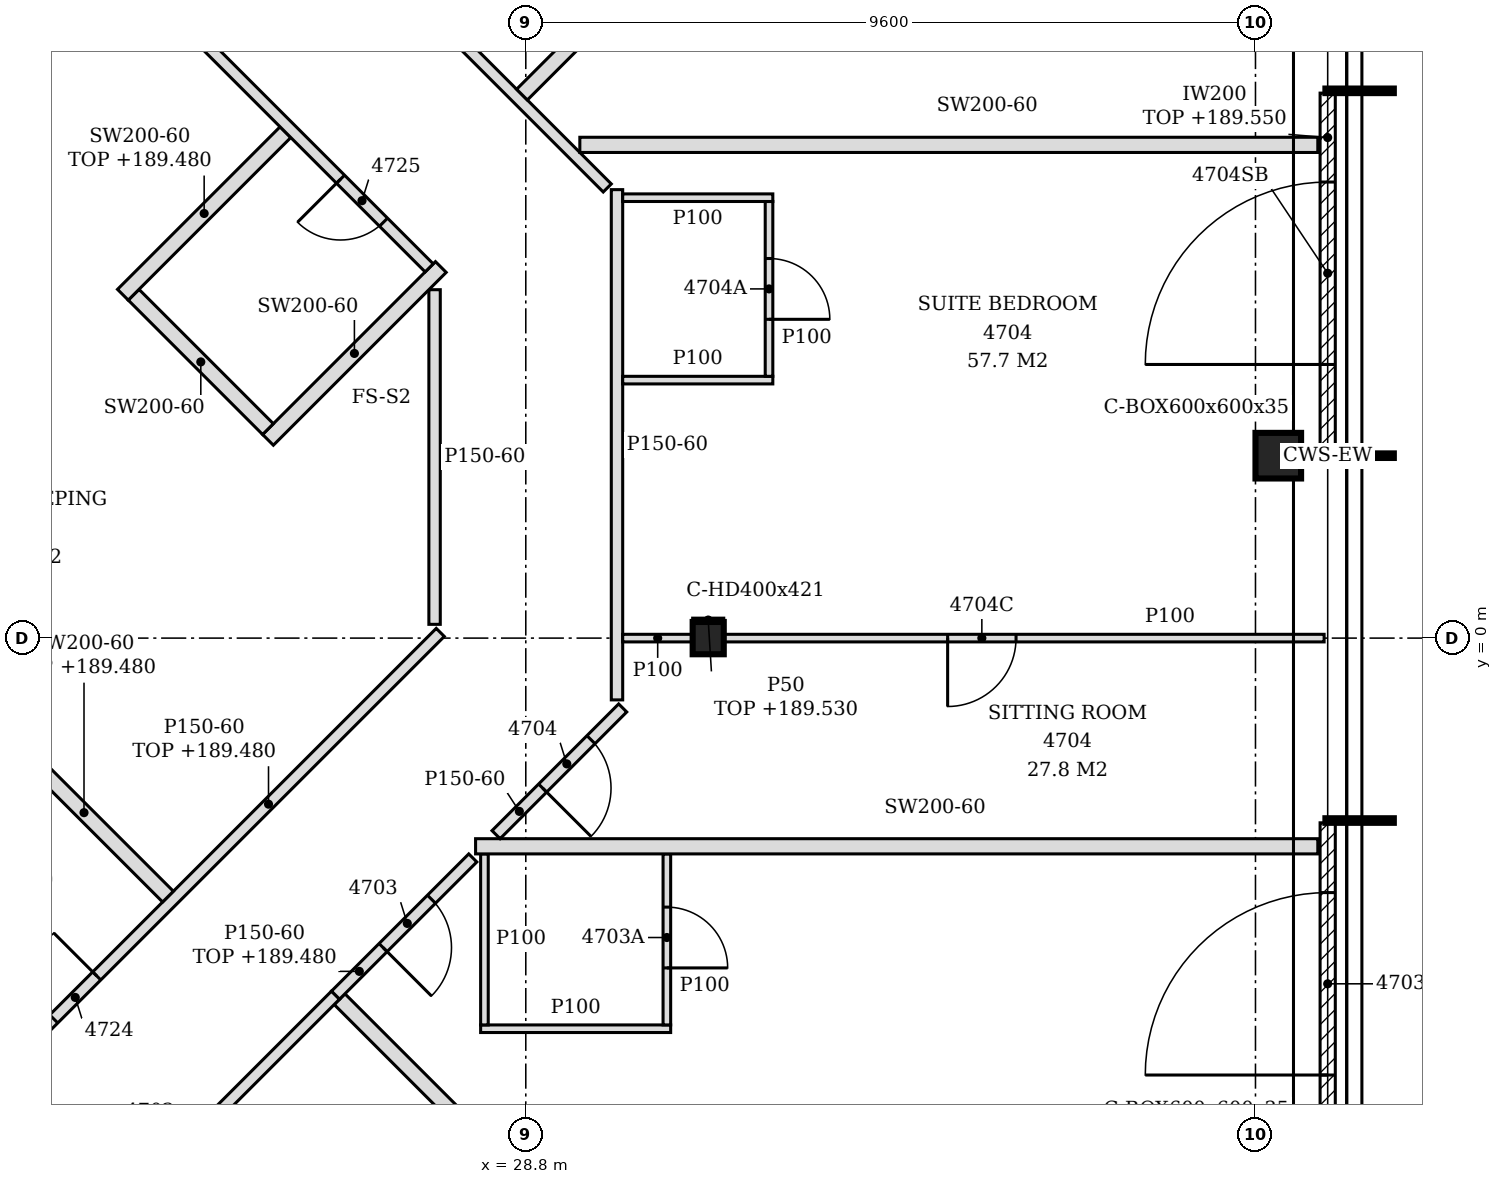
"""IFC4 building model, lengths in metres.
Left out: names, types, materials, properties, quantities, classifications, styles, units other than length and angle.
Written with IfcOpenShell. Run it as: python <this file> out.ifc"""

import sys

from ifc_helpers import new_model, si_unit, direction, frame, frame_2d, origin, origin_2d, place, context, subcontext, project, spatial, polyline, rectangle, hollow_rectangle, i_section, outline, extrude, clip, halfspace, element, fill, save


model = new_model("IFC4")
c1 = context("Model", 3, precision=1e-05, world=origin(), true_north=direction((0.0, 1.0)))
c2 = subcontext(c1, "Body", "Model", "MODEL_VIEW")
j1 = project(units=[si_unit("LENGTHUNIT", "METRE"), si_unit("PLANEANGLEUNIT", "RADIAN")], contexts=[c1])
p1 = place(None, origin())
s1 = spatial("IfcSite", under=j1, at=p1, CompositionType="ELEMENT")
p2 = place(p1, origin())
s2 = spatial("IfcBuilding", under=s1, at=p2, CompositionType="ELEMENT")
p3 = place(p2, frame((0.0, 0.0, 186.6)))
s3 = spatial("IfcBuildingStorey", under=s2, at=p3, CompositionType="ELEMENT", Elevation=186.6)
p4 = place(p3, frame((38.7, 2.4, -0.15), z_axis=(0.387218850162, -0.258105883692, 0.885123107191), x_axis=(0.554640662713, 0.83208998027, 0.0)))
e1 = element("IfcColumn", 1, at=p4, inside=s3, PredefinedType="COLUMN", context=c2, shape_type="Clipping", body=[
    clip(extrude(hollow_rectangle(XDim=0.6, YDim=0.6, WallThickness=0.035, at=origin_2d()), origin(), (0.0, 0.0, 1.0), 4.067), halfspace(frame((0.0, 0.0, 4.049), z_axis=(0.0, 0.0, 1.0), x_axis=(1.0, 0.0, 0.0)), False)),
])
p5 = place(p3, frame((31.2, 0.0, -0.15), z_axis=(0.0, 0.0, 1.0), x_axis=(1.0, 0.0, 0.0)))
e2 = element("IfcColumn", 2, at=p5, inside=s3, PredefinedType="COLUMN", context=c2, shape_type="SweptSolid", body=[
    extrude(i_section(OverallWidth=0.409, OverallDepth=0.425, WebThickness=0.033, FlangeThickness=0.052, FilletRadius=0.015, at=origin_2d()), origin(), (0.0, 0.0, 1.0), 3.6),
])
p6 = place(p3, frame((39.35, -7.056, 0.0), z_axis=(0.0, 0.0, 1.0), x_axis=(0.0, 1.0, 0.0)))
e3 = element("IfcWall", 3, at=p6, inside=s3, PredefinedType="NOTDEFINED", context=c2, shape_type="SweptSolid", body=[
    extrude(rectangle(XDim=4.626, YDim=0.2, at=frame_2d((2.313, 0.0))), origin(), (0.0, 0.0, 1.0), 2.95),
])
p7 = place(p6, frame((1.308, 0.0, 0.0)))
e4 = element("IfcOpeningElement", 4, at=p7, cuts=e3, PredefinedType="OPENING", context=c2, shape_type="SweptSolid", body=[
    extrude(rectangle(XDim=2.4, YDim=2.4, at=frame_2d((1.2, 1.2))), frame((0.0, 0.11, 0.0), z_axis=(0.0, -1.0, 0.0), x_axis=(1.0, 0.0, 0.0)), (0.0, 0.0, 1.0), 0.22),
])
p8 = place(p3, frame((39.35, 2.43, 0.0), z_axis=(0.0, 0.0, 1.0), x_axis=(0.0, 1.0, 0.0)))
e5 = element("IfcWall", 5, at=p8, inside=s3, PredefinedType="NOTDEFINED", context=c2, shape_type="SweptSolid", body=[
    extrude(rectangle(XDim=4.74, YDim=0.2, at=frame_2d((2.37, 0.0))), origin(), (0.0, 0.0, 1.0), 2.95),
])
p9 = place(p8, frame((1.17, 0.0, 0.0)))
e6 = element("IfcOpeningElement", 6, at=p9, cuts=e5, PredefinedType="OPENING", context=c2, shape_type="SweptSolid", body=[
    extrude(rectangle(XDim=2.4, YDim=2.4, at=frame_2d((1.2, 1.2))), frame((0.0, 0.11, 0.0), z_axis=(0.0, -1.0, 0.0), x_axis=(1.0, 0.0, 0.0)), (0.0, 0.0, 1.0), 0.22),
])
p10 = place(p3, frame((33.981, -12.381, 0.0), z_axis=(0.0, 0.0, 1.0), x_axis=(-0.707095469378, 0.707118092814, 0.0)))
e7 = element("IfcWall", 7, at=p10, inside=s3, PredefinedType="PARTITIONING", context=c2, shape_type="SweptSolid", body=[
    extrude(rectangle(XDim=10.792, YDim=0.2, at=frame_2d((5.396, 0.0))), origin(), (0.0, 0.0, 1.0), 2.63),
])
p11 = place(p3, frame((20.322, -10.672, 0.0), z_axis=(0.0, 0.0, 1.0), x_axis=(0.707106781187, 0.707106781187, 0.0)))
e8 = element("IfcWall", 8, at=p11, inside=s3, PredefinedType="PARTITIONING", context=c2, shape_type="SweptSolid", body=[
    extrude(rectangle(XDim=8.45, YDim=0.15, at=frame_2d((4.225, 0.0))), origin(), (0.0, 0.0, 1.0), 2.88),
])
p12 = place(p11, frame((0.869, 0.0, 0.0)))
e9 = element("IfcOpeningElement", 9, at=p12, cuts=e8, PredefinedType="OPENING", context=c2, shape_type="SweptSolid", body=[
    extrude(rectangle(XDim=0.9, YDim=2.1, at=frame_2d((0.45, 1.05))), frame((0.0, 0.085, 0.0), z_axis=(0.0, -1.0, 0.0), x_axis=(1.0, 0.0, 0.0)), (0.0, 0.0, 1.0), 0.17),
])
p13 = place(p11, frame((5.185, 0.0, 0.0)))
e10 = element("IfcOpeningElement", 10, at=p13, cuts=e8, PredefinedType="OPENING", context=c2, shape_type="SweptSolid", body=[
    extrude(rectangle(XDim=0.9, YDim=2.1, at=frame_2d((0.45, 1.05))), frame((0.0, 0.085, 0.0), z_axis=(0.0, -1.0, 0.0), x_axis=(1.0, 0.0, 0.0)), (0.0, 0.0, 1.0), 0.17),
])
p14 = place(p3, frame((21.671, -5.929, 0.0), z_axis=(0.0, 0.0, 1.0), x_axis=(0.707121156928, 0.707092405153, 0.0)))
e11 = element("IfcWall", 11, at=p14, inside=s3, PredefinedType="PARTITIONING", context=c2, shape_type="SweptSolid", body=[
    extrude(rectangle(XDim=8.491, YDim=0.15, at=frame_2d((4.246, 0.0))), origin(), (0.0, 0.0, 1.0), 2.88),
])
p15 = place(p14, frame((1.3, 0.0, 0.0)))
e12 = element("IfcOpeningElement", 12, at=p15, cuts=e11, PredefinedType="OPENING", context=c2, shape_type="SweptSolid", body=[
    extrude(rectangle(XDim=0.8, YDim=2.1, at=frame_2d((0.4, 1.05))), frame((0.0, 0.085, 0.0), z_axis=(0.0, -1.0, 0.0), x_axis=(1.0, 0.0, 0.0)), (0.0, 0.0, 1.0), 0.17),
])
p16 = place(p3, frame((28.206, -5.139, 0.0), z_axis=(0.0, 0.0, 1.0), x_axis=(1.0, 0.0, 0.0)))
e13 = element("IfcWall", 13, at=p16, inside=s3, PredefinedType="PARTITIONING", context=c2, shape_type="SweptSolid", body=[
    extrude(rectangle(XDim=2.5, YDim=0.1, at=frame_2d((1.25, 0.0))), origin(), (0.0, 0.0, 1.0), 3.45),
])
p17 = place(p3, frame((28.256, -5.089, 0.0), z_axis=(0.0, 0.0, 1.0), x_axis=(0.0, 1.0, 0.0)))
e14 = element("IfcWall", 14, at=p17, inside=s3, PredefinedType="PARTITIONING", context=c2, shape_type="SweptSolid", body=[
    extrude(outline(polyline([(0.0, 0.0), (2.25, 0.0), (2.25, 3.45), (1.744, 3.45), (1.742, 2.88), (1.534, 2.88), (1.532, 3.45), (0.0, 3.45), (0.0, 0.0)])), frame((0.0, 0.05, 0.0), z_axis=(0.0, -1.0, 0.0), x_axis=(1.0, 0.0, 0.0)), (0.0, 0.0, 1.0), 0.1),
])
p18 = place(p3, frame((30.656, -5.089, 0.0), z_axis=(0.0, 0.0, 1.0), x_axis=(0.0, 1.0, 0.0)))
e15 = element("IfcWall", 15, at=p18, inside=s3, PredefinedType="PARTITIONING", context=c2, shape_type="SweptSolid", body=[
    extrude(outline(polyline([(0.0, 0.0), (2.25, 0.0), (2.25, 3.45), (1.744, 3.45), (1.742, 2.88), (1.534, 2.88), (1.532, 3.45), (0.0, 3.45), (0.0, 0.0)])), frame((0.0, 0.05, 0.0), z_axis=(0.0, -1.0, 0.0), x_axis=(1.0, 0.0, 0.0)), (0.0, 0.0, 1.0), 0.1),
])
p19 = place(p18, frame((0.75, 0.0, 0.0)))
e16 = element("IfcOpeningElement", 16, at=p19, cuts=e15, PredefinedType="OPENING", context=c2, shape_type="SweptSolid", body=[
    extrude(rectangle(XDim=0.8, YDim=2.1, at=frame_2d((0.4, 1.05))), frame((0.0, 0.06, 0.0), z_axis=(0.0, -1.0, 0.0), x_axis=(1.0, 0.0, 0.0)), (0.0, 0.0, 1.0), 0.12),
])
p20 = place(p3, frame((26.297, -4.697, 0.0), z_axis=(0.0, 0.0, 1.0), x_axis=(0.707250205701, 0.706963327575, 0.0)))
e17 = element("IfcWall", 17, at=p20, inside=s3, PredefinedType="PARTITIONING", context=c2, shape_type="SweptSolid", body=[
    extrude(rectangle(XDim=2.553, YDim=0.15, at=frame_2d((1.276, 0.0))), origin(), (0.0, 0.0, 1.0), 2.88),
])
p21 = place(p20, frame((0.885, 0.0, 0.0)))
e18 = element("IfcOpeningElement", 18, at=p21, cuts=e17, PredefinedType="OPENING", context=c2, shape_type="SweptSolid", body=[
    extrude(rectangle(XDim=0.9, YDim=2.1, at=frame_2d((0.45, 1.05))), frame((0.0, 0.085, 0.0), z_axis=(0.0, -1.0, 0.0), x_axis=(1.0, 0.0, 0.0)), (0.0, 0.0, 1.0), 0.17),
])
p22 = place(p3, frame((24.093, -3.401, 0.0), z_axis=(0.0, 0.0, 1.0), x_axis=(-0.707263013346, 0.7069505145, 0.0)))
e19 = element("IfcWall", 19, at=p22, inside=s3, PredefinedType="PARTITIONING", context=c2, shape_type="SweptSolid", body=[
    extrude(rectangle(XDim=3.125, YDim=0.2, at=frame_2d((1.562, 0.0))), origin(), (0.0, 0.0, 1.0), 2.88),
])
p23 = place(p3, frame((28.139, -2.739, 0.0), z_axis=(0.0, 0.0, 1.0), x_axis=(1.0, 0.0, 0.0)))
e20 = element("IfcWall", 20, at=p23, inside=s3, PredefinedType="PARTITIONING", context=c2, shape_type="SweptSolid", body=[
    extrude(outline(polyline([(0.0, 0.0), (11.081, 0.0), (11.081, 3.45), (3.21, 3.45), (3.208, 2.63), (2.91, 2.63), (2.908, 3.45), (0.0, 3.45), (0.0, 0.0)])), frame((0.0, 0.1, 0.0), z_axis=(0.0, -1.0, 0.0), x_axis=(1.0, 0.0, 0.0)), (0.0, 0.0, 1.0), 0.2),
])
p24 = place(p3, frame((28.409, -2.586, 0.0), z_axis=(0.0, 0.0, 1.0), x_axis=(0.706899570422, 0.707313931248, 0.0)))
e21 = element("IfcWall", 21, at=p24, inside=s3, PredefinedType="PARTITIONING", context=c2, shape_type="SweptSolid", body=[
    extrude(rectangle(XDim=2.357, YDim=0.15, at=frame_2d((1.178, 0.0))), origin(), (0.0, 0.0, 1.0), 3.45),
])
p25 = place(p24, frame((0.867, 0.0, 0.0)))
e22 = element("IfcOpeningElement", 22, at=p25, cuts=e21, PredefinedType="OPENING", context=c2, shape_type="SweptSolid", body=[
    extrude(rectangle(XDim=0.9, YDim=2.1, at=frame_2d((0.45, 1.05))), frame((0.0, 0.085, 0.0), z_axis=(0.0, -1.0, 0.0), x_axis=(1.0, 0.0, 0.0)), (0.0, 0.0, 1.0), 0.17),
])
p26 = place(p3, frame((30.0, -0.813, 0.0), z_axis=(0.0, 0.0, 1.0), x_axis=(0.0, 1.0, 0.0)))
e23 = element("IfcWall", 23, at=p26, inside=s3, PredefinedType="PARTITIONING", context=c2, shape_type="SweptSolid", body=[
    extrude(outline(polyline([(0.0, 0.0), (6.713, 0.0), (6.713, 3.45), (2.268, 3.45), (2.266, 2.88), (2.058, 2.88), (2.056, 3.45), (0.0, 3.45), (0.0, 0.0)])), frame((0.0, 0.075, 0.0), z_axis=(0.0, -1.0, 0.0), x_axis=(1.0, 0.0, 0.0)), (0.0, 0.0, 1.0), 0.15),
])
p27 = place(p3, frame((30.075, 0.0, 0.0), z_axis=(0.0, 0.0, 1.0), x_axis=(1.0, 0.0, 0.0)))
e24 = element("IfcWall", 24, at=p27, inside=s3, PredefinedType="PARTITIONING", context=c2, shape_type="SweptSolid", body=[
    extrude(rectangle(XDim=0.921, YDim=0.1, at=frame_2d((0.46, 0.0))), origin(), (0.0, 0.0, 1.0), 3.45),
])
p28 = place(p3, frame((31.405, 0.0, 0.0), z_axis=(0.0, 0.0, 1.0), x_axis=(1.0, 0.0, 0.0)))
e25 = element("IfcWall", 25, at=p28, inside=s3, PredefinedType="PARTITIONING", context=c2, shape_type="SweptSolid", body=[
    extrude(rectangle(XDim=7.898, YDim=0.1, at=frame_2d((3.949, 0.0))), origin(), (0.0, 0.0, 1.0), 3.45),
])
p29 = place(p28, frame((2.946, 0.0, 0.0)))
e26 = element("IfcOpeningElement", 26, at=p29, cuts=e25, PredefinedType="OPENING", context=c2, shape_type="SweptSolid", body=[
    extrude(rectangle(XDim=0.9, YDim=2.1, at=frame_2d((0.45, 1.05))), frame((0.0, 0.06, 0.0), z_axis=(0.0, -1.0, 0.0), x_axis=(1.0, 0.0, 0.0)), (0.0, 0.0, 1.0), 0.12),
])
p30 = place(p3, frame((27.6, 0.181, 0.0), z_axis=(0.0, 0.0, 1.0), x_axis=(0.0, 1.0, 0.0)))
e27 = element("IfcWall", 27, at=p30, inside=s3, PredefinedType="PARTITIONING", context=c2, shape_type="SweptSolid", body=[
    extrude(outline(polyline([(0.0, 0.0), (4.402, 0.0), (4.403, 3.45), (1.274, 3.45), (1.272, 2.88), (1.064, 2.88), (1.062, 3.45), (0.0, 3.45), (0.0, 0.0)])), frame((0.0, 0.075, 0.0), z_axis=(0.0, -1.0, 0.0), x_axis=(1.0, 0.0, 0.0)), (0.0, 0.0, 1.0), 0.15),
])
p31 = place(p3, frame((25.408, 2.608, 0.0), z_axis=(0.0, 0.0, 1.0), x_axis=(0.707144737481, 0.707068822855, 0.0)))
e28 = element("IfcWall", 28, at=p31, inside=s3, PredefinedType="PARTITIONING", context=c2, shape_type="SweptSolid", body=[
    extrude(rectangle(XDim=3.216, YDim=0.2, at=frame_2d((1.608, 0.0))), origin(), (0.0, 0.0, 1.0), 3.45),
])
p32 = place(p3, frame((25.408, 2.75, 0.0), z_axis=(0.0, 0.0, 1.0), x_axis=(-0.707106781187, 0.707106781187, 0.0)))
e29 = element("IfcWall", 29, at=p32, inside=s3, PredefinedType="PARTITIONING", context=c2, shape_type="SweptSolid", body=[
    extrude(rectangle(XDim=2.5, YDim=0.2, at=frame_2d((1.25, 0.0))), origin(), (0.0, 0.0, 1.0), 3.45),
])
p33 = place(p3, frame((30.075, 3.394, 0.0), z_axis=(0.0, 0.0, 1.0), x_axis=(1.0, 0.0, 0.0)))
e30 = element("IfcWall", 30, at=p33, inside=s3, PredefinedType="PARTITIONING", context=c2, shape_type="SweptSolid", body=[
    extrude(outline(polyline([(0.0, 0.0), (1.975, 0.0), (1.975, 3.45), (1.275, 3.45), (1.273, 2.93), (0.975, 2.93), (0.973, 3.45), (0.0, 3.45), (0.0, 0.0)])), frame((0.0, 0.05, 0.0), z_axis=(0.0, -1.0, 0.0), x_axis=(1.0, 0.0, 0.0)), (0.0, 0.0, 1.0), 0.1),
])
p34 = place(p3, frame((32.0, 3.444, 0.0), z_axis=(0.0, 0.0, 1.0), x_axis=(0.0, 1.0, 0.0)))
e31 = element("IfcWall", 31, at=p34, inside=s3, PredefinedType="PARTITIONING", context=c2, shape_type="SweptSolid", body=[
    extrude(rectangle(XDim=2.3, YDim=0.1, at=frame_2d((1.15, 0.0))), origin(), (0.0, 0.0, 1.0), 3.45),
])
p35 = place(p34, frame((0.75, 0.0, 0.0)))
e32 = element("IfcOpeningElement", 32, at=p35, cuts=e31, PredefinedType="OPENING", context=c2, shape_type="SweptSolid", body=[
    extrude(rectangle(XDim=0.8, YDim=2.1, at=frame_2d((0.4, 1.05))), frame((0.0, 0.06, 0.0), z_axis=(0.0, -1.0, 0.0), x_axis=(1.0, 0.0, 0.0)), (0.0, 0.0, 1.0), 0.12),
])
p36 = place(p3, frame((23.499, 4.517, 0.0), z_axis=(0.0, 0.0, 1.0), x_axis=(0.707106781187, 0.707106781187, 0.0)))
e33 = element("IfcWall", 33, at=p36, inside=s3, PredefinedType="PARTITIONING", context=c2, shape_type="SweptSolid", body=[
    extrude(rectangle(XDim=3.025, YDim=0.2, at=frame_2d((1.512, 0.0))), origin(), (0.0, 0.0, 1.0), 2.88),
])
p37 = place(p3, frame((27.529, 4.871, 0.0), z_axis=(0.0, 0.0, 1.0), x_axis=(-0.707106781187, 0.707106781187, 0.0)))
e34 = element("IfcWall", 34, at=p37, inside=s3, PredefinedType="PARTITIONING", context=c2, shape_type="SweptSolid", body=[
    extrude(rectangle(XDim=11.5, YDim=0.15, at=frame_2d((5.75, 0.0))), origin(), (0.0, 0.0, 1.0), 2.88),
])
p38 = place(p37, frame((0.85, 0.0, 0.0)))
e35 = element("IfcOpeningElement", 35, at=p38, cuts=e34, PredefinedType="OPENING", context=c2, shape_type="SweptSolid", body=[
    extrude(rectangle(XDim=0.8, YDim=2.1, at=frame_2d((0.4, 1.05))), frame((0.0, 0.085, 0.0), z_axis=(0.0, -1.0, 0.0), x_axis=(1.0, 0.0, 0.0)), (0.0, 0.0, 1.0), 0.17),
])
p39 = place(p3, frame((30.075, 5.794, 0.0), z_axis=(0.0, 0.0, 1.0), x_axis=(1.0, 0.0, 0.0)))
e36 = element("IfcWall", 36, at=p39, inside=s3, PredefinedType="PARTITIONING", context=c2, shape_type="SweptSolid", body=[
    extrude(outline(polyline([(0.0, 0.0), (1.975, 0.0), (1.975, 3.45), (1.275, 3.45), (1.273, 2.93), (0.975, 2.93), (0.973, 3.45), (0.0, 3.45), (0.0, 0.0)])), frame((0.0, 0.05, 0.0), z_axis=(0.0, -1.0, 0.0), x_axis=(1.0, 0.0, 0.0)), (0.0, 0.0, 1.0), 0.1),
])
p40 = place(p3, frame((29.872, 5.922, 0.0), z_axis=(0.0, 0.0, 1.0), x_axis=(-0.707119057879, 0.707094504281, 0.0)))
e37 = element("IfcWall", 37, at=p40, inside=s3, PredefinedType="PARTITIONING", context=c2, shape_type="SweptSolid", body=[
    extrude(rectangle(XDim=9.943, YDim=0.15, at=frame_2d((4.972, 0.0))), origin(), (0.0, 0.0, 1.0), 2.88),
])
p41 = place(p40, frame((2.909, 0.0, 0.0)))
e38 = element("IfcOpeningElement", 38, at=p41, cuts=e37, PredefinedType="OPENING", context=c2, shape_type="SweptSolid", body=[
    extrude(rectangle(XDim=0.9, YDim=2.1, at=frame_2d((0.45, 1.05))), frame((0.0, 0.085, 0.0), z_axis=(0.0, -1.0, 0.0), x_axis=(1.0, 0.0, 0.0)), (0.0, 0.0, 1.0), 0.17),
])
p42 = place(p40, frame((7.05, 0.0, 0.0)))
e39 = element("IfcOpeningElement", 39, at=p42, cuts=e37, PredefinedType="OPENING", context=c2, shape_type="SweptSolid", body=[
    extrude(rectangle(XDim=0.9, YDim=2.1, at=frame_2d((0.45, 1.05))), frame((0.0, 0.085, 0.0), z_axis=(0.0, -1.0, 0.0), x_axis=(1.0, 0.0, 0.0)), (0.0, 0.0, 1.0), 0.17),
])
p43 = place(p3, frame((29.511, 6.489, 0.0), z_axis=(0.0, 0.0, 1.0), x_axis=(1.0, 0.0, 0.0)))
e40 = element("IfcWall", 40, at=p43, inside=s3, PredefinedType="PARTITIONING", context=c2, shape_type="SweptSolid", body=[
    extrude(outline(polyline([(0.0, 0.0), (9.709, 0.0), (9.709, 3.45), (1.839, 3.45), (1.837, 2.93), (1.539, 2.93), (1.537, 3.45), (0.0, 3.45), (0.0, 0.0)])), frame((0.0, 0.1, 0.0), z_axis=(0.0, -1.0, 0.0), x_axis=(1.0, 0.0, 0.0)), (0.0, 0.0, 1.0), 0.2),
])
p44 = place(p3, frame((28.75, 7.15, 0.0), z_axis=(0.0, 0.0, 1.0), x_axis=(0.707068272989, 0.707145287287, 0.0)))
e41 = element("IfcWall", 41, at=p44, inside=s3, PredefinedType="PARTITIONING", context=c2, shape_type="SweptSolid", body=[
    extrude(rectangle(XDim=3.17, YDim=0.2, at=frame_2d((1.585, 0.0))), origin(), (0.0, 0.0, 1.0), 3.45),
])
p45 = place(p3, frame((30.996, 0.238, 0.0), z_axis=(0.0, 0.0, 1.0), x_axis=(1.0, 0.0, 0.0)))
e42 = element("IfcWall", 42, at=p45, inside=s3, PredefinedType="PARTITIONING", context=c2, shape_type="SweptSolid", body=[
    extrude(rectangle(XDim=0.409, YDim=0.05, at=frame_2d((0.205, 0.0))), origin(), (0.0, 0.0, 1.0), 2.93),
])
p46 = place(p7, origin())
e43 = element("IfcDoor", 43, at=p46, inside=s3, OperationType="SINGLE_SWING_LEFT", PredefinedType="DOOR", context=c2, shape_type="SweptSolid", body=[
    extrude(rectangle(XDim=2.4, YDim=2.4, at=frame_2d((1.2, 1.2))), frame((0.0, 0.025, 0.0), z_axis=(0.0, -1.0, 0.0), x_axis=(1.0, 0.0, 0.0)), (0.0, 0.0, 1.0), 0.05),
])
fill(e4, e43)
p47 = place(p9, origin())
e44 = element("IfcDoor", 44, at=p47, inside=s3, OperationType="SINGLE_SWING_LEFT", PredefinedType="DOOR", context=c2, shape_type="SweptSolid", body=[
    extrude(rectangle(XDim=2.4, YDim=2.4, at=frame_2d((1.2, 1.2))), frame((0.0, 0.025, 0.0), z_axis=(0.0, -1.0, 0.0), x_axis=(1.0, 0.0, 0.0)), (0.0, 0.0, 1.0), 0.05),
])
fill(e6, e44)
p48 = place(p21, frame((0.9, 0.0, 0.0), z_axis=(0.0, 0.0, 1.0), x_axis=(-1.0, 0.0, 0.0)))
e45 = element("IfcDoor", 45, at=p48, inside=s3, OperationType="SINGLE_SWING_RIGHT", PredefinedType="DOOR", context=c2, shape_type="SweptSolid", body=[
    extrude(rectangle(XDim=0.9, YDim=2.1, at=frame_2d((0.45, 1.05))), frame((0.0, 0.025, 0.0), z_axis=(0.0, -1.0, 0.0), x_axis=(1.0, 0.0, 0.0)), (0.0, 0.0, 1.0), 0.05),
])
fill(e18, e45)
p49 = place(p19, frame((0.8, 0.0, 0.0), z_axis=(0.0, 0.0, 1.0), x_axis=(-1.0, 0.0, 0.0)))
e46 = element("IfcDoor", 46, at=p49, inside=s3, OperationType="SINGLE_SWING_RIGHT", PredefinedType="DOOR", context=c2, shape_type="SweptSolid", body=[
    extrude(rectangle(XDim=0.8, YDim=2.1, at=frame_2d((0.4, 1.05))), frame((0.0, 0.025, 0.0), z_axis=(0.0, -1.0, 0.0), x_axis=(1.0, 0.0, 0.0)), (0.0, 0.0, 1.0), 0.05),
])
fill(e16, e46)
p50 = place(p25, frame((0.9, 0.0, 0.0), z_axis=(0.0, 0.0, 1.0), x_axis=(-1.0, 0.0, 0.0)))
e47 = element("IfcDoor", 47, at=p50, inside=s3, OperationType="SINGLE_SWING_RIGHT", PredefinedType="DOOR", context=c2, shape_type="SweptSolid", body=[
    extrude(rectangle(XDim=0.9, YDim=2.1, at=frame_2d((0.45, 1.05))), frame((0.0, 0.025, 0.0), z_axis=(0.0, -1.0, 0.0), x_axis=(1.0, 0.0, 0.0)), (0.0, 0.0, 1.0), 0.05),
])
fill(e22, e47)
p51 = place(p29, frame((0.9, 0.0, 0.0), z_axis=(0.0, 0.0, 1.0), x_axis=(-1.0, 0.0, 0.0)))
e48 = element("IfcDoor", 48, at=p51, inside=s3, OperationType="SINGLE_SWING_RIGHT", PredefinedType="DOOR", context=c2, shape_type="SweptSolid", body=[
    extrude(rectangle(XDim=0.9, YDim=2.1, at=frame_2d((0.45, 1.05))), frame((0.0, 0.025, 0.0), z_axis=(0.0, -1.0, 0.0), x_axis=(1.0, 0.0, 0.0)), (0.0, 0.0, 1.0), 0.05),
])
fill(e26, e48)
p52 = place(p35, frame((0.8, 0.0, 0.0), z_axis=(0.0, 0.0, 1.0), x_axis=(-1.0, 0.0, 0.0)))
e49 = element("IfcDoor", 49, at=p52, inside=s3, OperationType="SINGLE_SWING_RIGHT", PredefinedType="DOOR", context=c2, shape_type="SweptSolid", body=[
    extrude(rectangle(XDim=0.8, YDim=2.1, at=frame_2d((0.4, 1.05))), frame((0.0, 0.025, 0.0), z_axis=(0.0, -1.0, 0.0), x_axis=(1.0, 0.0, 0.0)), (0.0, 0.0, 1.0), 0.05),
])
fill(e32, e49)
p53 = place(p15, origin())
e50 = element("IfcDoor", 50, at=p53, inside=s3, OperationType="SINGLE_SWING_RIGHT", PredefinedType="DOOR", context=c2, shape_type="SweptSolid", body=[
    extrude(rectangle(XDim=0.8, YDim=2.1, at=frame_2d((0.4, 1.05))), frame((0.0, 0.025, 0.0), z_axis=(0.0, -1.0, 0.0), x_axis=(1.0, 0.0, 0.0)), (0.0, 0.0, 1.0), 0.05),
])
fill(e12, e50)
p54 = place(p38, origin())
e51 = element("IfcDoor", 51, at=p54, inside=s3, OperationType="SINGLE_SWING_RIGHT", PredefinedType="DOOR", context=c2, shape_type="SweptSolid", body=[
    extrude(rectangle(XDim=0.8, YDim=2.1, at=frame_2d((0.4, 1.05))), frame((0.0, 0.025, 0.0), z_axis=(0.0, -1.0, 0.0), x_axis=(1.0, 0.0, 0.0)), (0.0, 0.0, 1.0), 0.05),
])
fill(e35, e51)
save(model, sys.argv[1])
